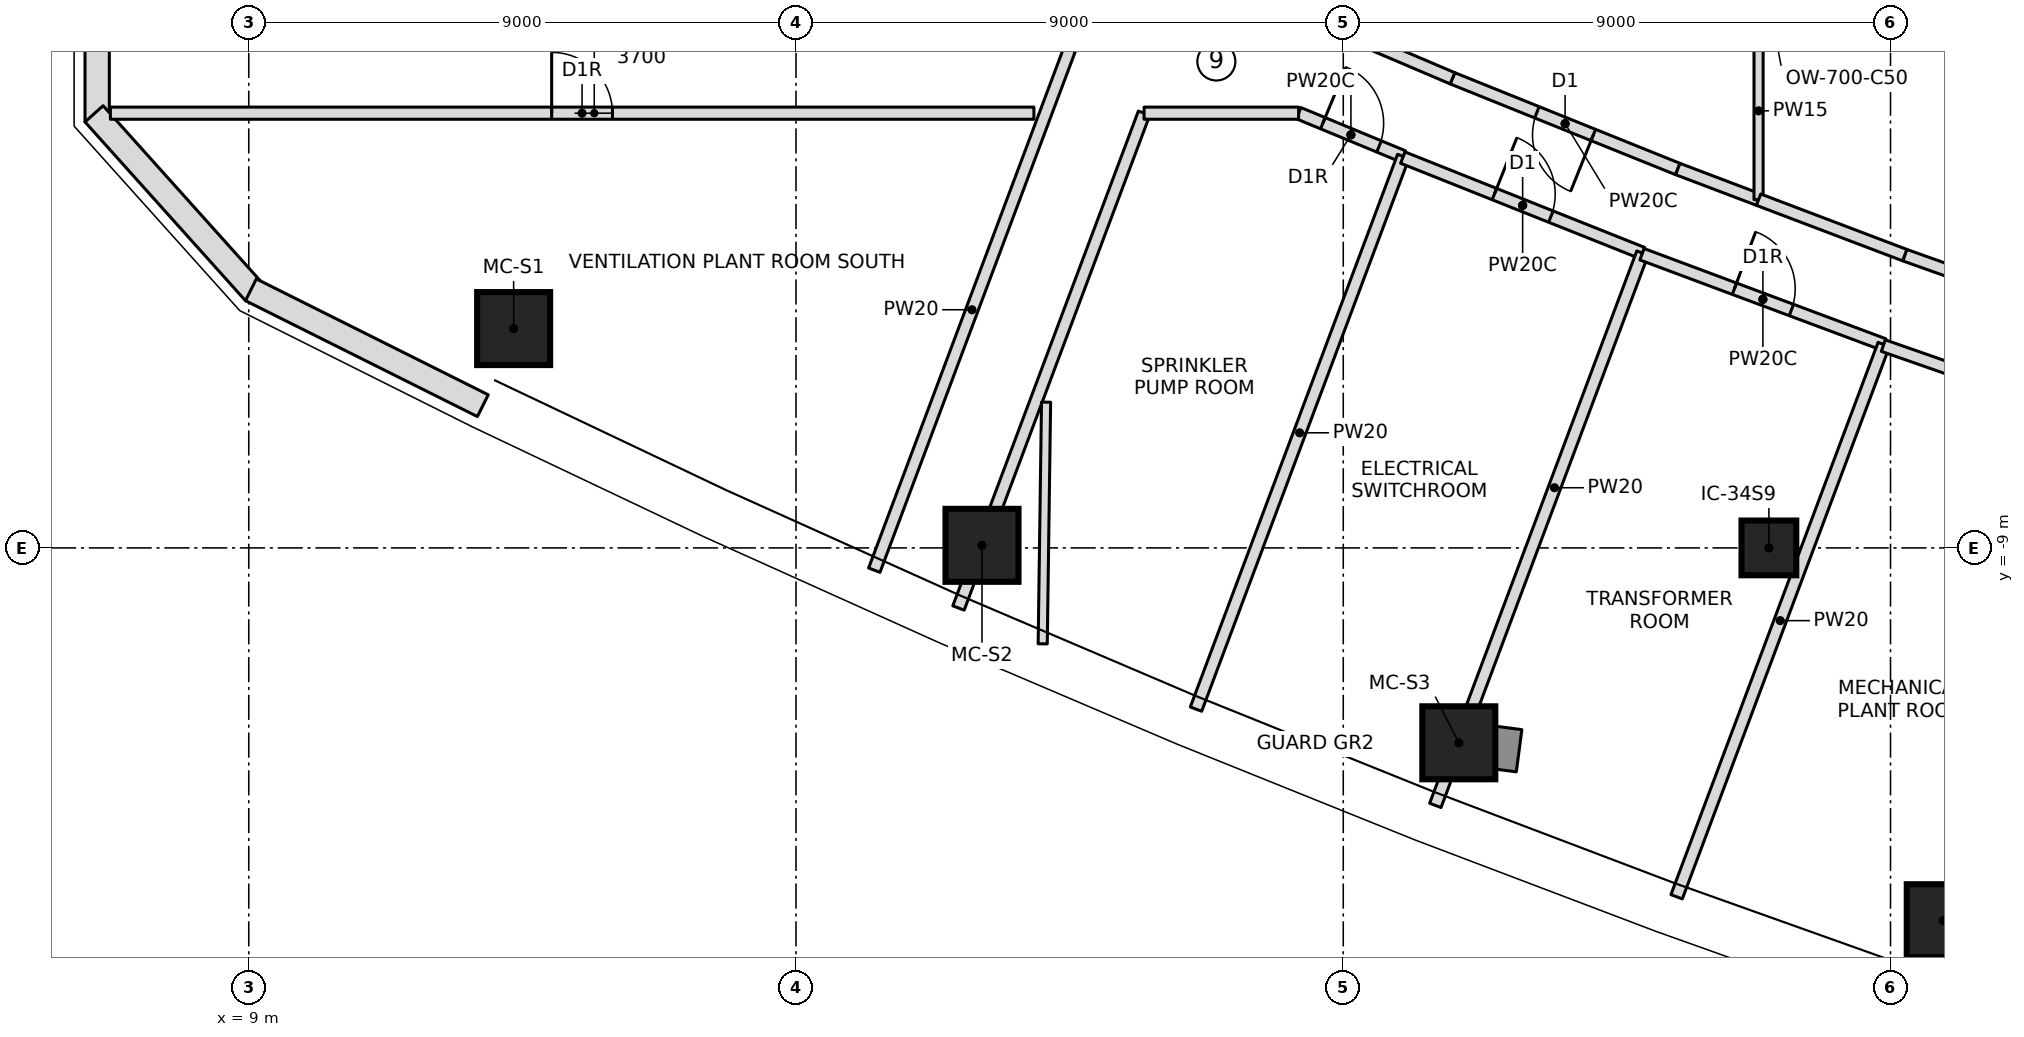
"""IFC4 building model, lengths in metres.
Left out: names, types, materials, properties, quantities, classifications, styles, units other than length and angle.
Written with IfcOpenShell. Run it as: python <this file> out.ifc"""

import sys

from ifc_helpers import new_model, si_unit, direction, frame, frame_2d, origin, origin_2d, place, context, subcontext, project, spatial, polyline, rectangle, outline, extrude, element, fill, save


model = new_model("IFC4")
c1 = context("Model", 3, precision=1e-05, world=origin(), true_north=direction((0.0, 1.0)))
c2 = subcontext(c1, "Body", "Model", "MODEL_VIEW")
j1 = project(units=[si_unit("LENGTHUNIT", "METRE"), si_unit("PLANEANGLEUNIT", "RADIAN")], contexts=[c1])
p1 = place(None, origin())
s1 = spatial("IfcSite", under=j1, at=p1, CompositionType="ELEMENT")
p2 = place(p1, origin())
s2 = spatial("IfcBuilding", under=s1, at=p2, CompositionType="ELEMENT")
p3 = place(p2, frame((0.0, 0.0, 256.3)))
s3 = spatial("IfcBuildingStorey", under=s2, at=p3, CompositionType="ELEMENT", Elevation=256.3)
for number, where, z_axis, x_axis in (
    (1, (13.356, -5.393, 0.0), (0.0, 0.0, 1.0), (1.0, 0.0, 0.0)),
    (2, (21.059, -8.958, 0.0), (0.0, 0.0, 1.0), (1.0, 0.0, 0.0)),
    (3, (28.9, -12.205, 0.0), (0.0, 0.0, 1.0), (1.0, 0.0, 0.0)),
    (4, (36.867, -15.132, 0.0), (0.0, 0.0, 1.0), (1.0, 0.0, 0.0)),
):
    element("IfcColumn", number, at=place(p3, frame(where, z_axis=z_axis, x_axis=x_axis)), inside=s3, PredefinedType="COLUMN", context=c2, shape_type="SweptSolid", body=[
        extrude(rectangle(XDim=1.2, YDim=1.2, at=origin_2d()), origin(), (0.0, 0.0, 1.0), 5.2),
    ])
p4 = place(p3, frame((34.0, -9.0, 0.0), z_axis=(0.0, 0.0, 1.0), x_axis=(1.0, 0.0, 0.0)))
e5 = element("IfcColumn", 5, at=p4, inside=s3, PredefinedType="COLUMN", context=c2, shape_type="SweptSolid", body=[
    extrude(rectangle(XDim=0.9, YDim=0.9, at=origin_2d()), origin(), (0.0, 0.0, 1.0), 7.0),
])
p5 = place(p3, frame((29.892, -12.336, 0.0), z_axis=(0.0, 0.0, 1.0), x_axis=(-0.991401867066, 0.130852351822, 0.0)))
e6 = element("IfcWall", 6, at=p5, inside=s3, PredefinedType="SHEAR", context=c2, shape_type="SweptSolid", body=[
    extrude(rectangle(XDim=1.0, YDim=0.7, at=frame_2d((0.5, 0.0))), origin(), (0.0, 0.0, 1.0), 6.7),
])
p6 = place(p3, frame((6.507, 1.918, 0.0), z_axis=(0.0, 0.0, 1.0), x_axis=(0.0, -1.0, 0.0)))
e7 = element("IfcWall", 7, at=p6, inside=s3, PredefinedType="NOTDEFINED", context=c2, shape_type="SweptSolid", body=[
    extrude(outline(polyline([(-0.077, -0.2), (3.912, -0.2), (3.759, 0.2), (0.077, 0.2), (-0.077, -0.2)])), origin(), (0.0, 0.0, 1.0), 6.7),
])
p7 = place(p3, frame((6.507, -1.918, 0.0), z_axis=(0.0, 0.0, 1.0), x_axis=(0.668018215058, -0.744144921605, 0.0)))
e8 = element("IfcWall", 8, at=p7, inside=s3, PredefinedType="NOTDEFINED", context=c2, shape_type="SweptSolid", body=[
    extrude(outline(polyline([(-0.077, -0.2), (3.874, -0.2), (3.798, 0.2), (0.077, 0.2), (-0.077, -0.2)])), origin(), (0.0, 0.0, 1.0), 6.7),
])
p8 = place(p3, frame((9.069, -4.772, 0.0), z_axis=(0.0, 0.0, 1.0), x_axis=(0.894554263274, -0.446959360634, 0.0)))
e9 = element("IfcWall", 9, at=p8, inside=s3, PredefinedType="NOTDEFINED", context=c2, shape_type="SweptSolid", body=[
    extrude(outline(polyline([(-0.038, -0.2), (4.226, -0.2), (4.226, 0.2), (0.038, 0.2), (-0.038, -0.2)])), origin(), (0.0, 0.0, 1.0), 6.7),
])
p9 = place(p3, frame((6.725, -1.85, 0.0), z_axis=(0.0, 0.0, 1.0), x_axis=(1.0, 0.0, 0.0)))
e10 = element("IfcWall", 10, at=p9, inside=s3, PredefinedType="PARTITIONING", context=c2, shape_type="SweptSolid", body=[
    extrude(rectangle(XDim=15.188, YDim=0.2, at=frame_2d((7.594, 0.0))), origin(), (0.0, 0.0, 1.0), 6.7),
])
p10 = place(p9, frame((7.257, 0.0, 0.0)))
e11 = element("IfcOpeningElement", 11, at=p10, cuts=e10, PredefinedType="OPENING", context=c2, shape_type="SweptSolid", body=[
    extrude(rectangle(XDim=1.0, YDim=2.1, at=frame_2d((0.5, 1.05))), frame((0.0, 0.11, 0.0), z_axis=(0.0, -1.0, 0.0), x_axis=(1.0, 0.0, 0.0)), (0.0, 0.0, 1.0), 0.22),
])
p11 = place(p3, frame((19.288, -9.366, 0.0), z_axis=(0.0, 0.0, 1.0), x_axis=(0.351132214998, 0.936325887494, 0.0)))
e12 = element("IfcWall", 12, at=p11, inside=s3, PredefinedType="PARTITIONING", context=c2, shape_type="SweptSolid", body=[
    extrude(rectangle(XDim=9.149, YDim=0.2, at=frame_2d((4.574, 0.0))), origin(), (0.0, 0.0, 1.0), 6.7),
])
p12 = place(p3, frame((20.672, -9.988, 0.0), z_axis=(0.0, 0.0, 1.0), x_axis=(0.351141911069, 0.936322251306, 0.0)))
e13 = element("IfcWall", 13, at=p12, inside=s3, PredefinedType="PARTITIONING", context=c2, shape_type="SweptSolid", body=[
    extrude(rectangle(XDim=8.692, YDim=0.2, at=frame_2d((4.346, 0.0))), origin(), (0.0, 0.0, 1.0), 6.7),
])
p13 = place(p3, frame((26.266, -1.85, 0.0), z_axis=(0.0, 0.0, 1.0), x_axis=(0.924055156704, -0.382259162569, 0.0)))
e14 = element("IfcWall", 14, at=p13, inside=s3, PredefinedType="PARTITIONING", context=c2, shape_type="SweptSolid", body=[
    extrude(rectangle(XDim=1.862, YDim=0.2, at=frame_2d((0.931, 0.0))), origin(), (0.0, 0.0, 1.0), 6.7),
])
p14 = place(p13, frame((0.431, 0.0, 0.0)))
e15 = element("IfcOpeningElement", 15, at=p14, cuts=e14, PredefinedType="OPENING", context=c2, shape_type="SweptSolid", body=[
    extrude(rectangle(XDim=1.0, YDim=2.1, at=frame_2d((0.5, 1.05))), frame((0.0, 0.11, 0.0), z_axis=(0.0, -1.0, 0.0), x_axis=(1.0, 0.0, 0.0)), (0.0, 0.0, 1.0), 0.22),
])
p15 = place(p3, frame((24.578, -11.652, 0.0), z_axis=(0.0, 0.0, 1.0), x_axis=(0.351153757858, 0.936317808408, 0.0)))
e16 = element("IfcWall", 16, at=p15, inside=s3, PredefinedType="PARTITIONING", context=c2, shape_type="SweptSolid", body=[
    extrude(rectangle(XDim=9.708, YDim=0.2, at=frame_2d((4.854, 0.0))), origin(), (0.0, 0.0, 1.0), 6.7),
])
p16 = place(p3, frame((27.98, -2.581, 0.0), z_axis=(0.0, 0.0, 1.0), x_axis=(0.928920552813, -0.370279092795, 0.0)))
e17 = element("IfcWall", 17, at=p16, inside=s3, PredefinedType="PARTITIONING", context=c2, shape_type="SweptSolid", body=[
    extrude(rectangle(XDim=4.242, YDim=0.2, at=frame_2d((2.121, 0.0))), origin(), (0.0, 0.0, 1.0), 6.7),
])
p17 = place(p16, frame((1.621, 0.0, 0.0)))
e18 = element("IfcOpeningElement", 18, at=p17, cuts=e17, PredefinedType="OPENING", context=c2, shape_type="SweptSolid", body=[
    extrude(rectangle(XDim=1.0, YDim=2.1, at=frame_2d((0.5, 1.05))), frame((0.0, 0.11, 0.0), z_axis=(0.0, -1.0, 0.0), x_axis=(1.0, 0.0, 0.0)), (0.0, 0.0, 1.0), 0.22),
])
p18 = place(p3, frame((28.514, -13.235, 0.0), z_axis=(0.0, 0.0, 1.0), x_axis=(0.351196471421, 0.936301788133, 0.0)))
e19 = element("IfcWall", 19, at=p18, inside=s3, PredefinedType="PARTITIONING", context=c2, shape_type="SweptSolid", body=[
    extrude(rectangle(XDim=1.099, YDim=0.2, at=frame_2d((0.55, 0.0))), origin(), (0.0, 0.0, 1.0), 6.7),
])
p19 = place(p3, frame((29.026, -11.869, 0.0), z_axis=(0.0, 0.0, 1.0), x_axis=(0.351120195515, 0.93633039484, 0.0)))
e20 = element("IfcWall", 20, at=p19, inside=s3, PredefinedType="PARTITIONING", context=c2, shape_type="SweptSolid", body=[
    extrude(rectangle(XDim=8.242, YDim=0.2, at=frame_2d((4.121, 0.0))), origin(), (0.0, 0.0, 1.0), 6.7),
])
p20 = place(p3, frame((31.913, -4.17, 0.0), z_axis=(0.0, 0.0, 1.0), x_axis=(0.936848300955, -0.349735987565, 0.0)))
e21 = element("IfcWall", 21, at=p20, inside=s3, PredefinedType="PARTITIONING", context=c2, shape_type="SweptSolid", body=[
    extrude(rectangle(XDim=4.244, YDim=0.2, at=frame_2d((2.122, 0.0))), origin(), (0.0, 0.0, 1.0), 6.7),
])
p21 = place(p20, frame((1.622, 0.0, 0.0)))
e22 = element("IfcOpeningElement", 22, at=p21, cuts=e21, PredefinedType="OPENING", context=c2, shape_type="SweptSolid", body=[
    extrude(rectangle(XDim=1.0, YDim=2.1, at=frame_2d((0.5, 1.05))), frame((0.0, 0.11, 0.0), z_axis=(0.0, -1.0, 0.0), x_axis=(1.0, 0.0, 0.0)), (0.0, 0.0, 1.0), 0.22),
])
p22 = place(p3, frame((32.483, -14.738, 0.0), z_axis=(0.0, 0.0, 1.0), x_axis=(0.351117925717, 0.936331246002, 0.0)))
e23 = element("IfcWall", 23, at=p22, inside=s3, PredefinedType="PARTITIONING", context=c2, shape_type="SweptSolid", body=[
    extrude(rectangle(XDim=9.701, YDim=0.2, at=frame_2d((4.851, 0.0))), origin(), (0.0, 0.0, 1.0), 6.7),
])
p23 = place(p3, frame((35.882, -5.673, 0.0), z_axis=(0.0, 0.0, 1.0), x_axis=(0.944107376821, -0.329638075823, 0.0)))
e24 = element("IfcWall", 24, at=p23, inside=s3, PredefinedType="PARTITIONING", context=c2, shape_type="SweptSolid", body=[
    extrude(rectangle(XDim=4.245, YDim=0.2, at=frame_2d((2.122, 0.0))), origin(), (0.0, 0.0, 1.0), 6.7),
])
p24 = place(p23, frame((1.622, 0.0, 0.0)))
e25 = element("IfcOpeningElement", 25, at=p24, cuts=e24, PredefinedType="OPENING", context=c2, shape_type="SweptSolid", body=[
    extrude(rectangle(XDim=1.0, YDim=2.1, at=frame_2d((0.5, 1.05))), frame((0.0, 0.11, 0.0), z_axis=(0.0, -1.0, 0.0), x_axis=(1.0, 0.0, 0.0)), (0.0, 0.0, 1.0), 0.22),
])
p25 = place(p3, frame((36.481, -16.161, 0.0), z_axis=(0.0, 0.0, 1.0), x_axis=(0.35112895446, 0.936327110224, 0.0)))
e26 = element("IfcWall", 26, at=p25, inside=s3, PredefinedType="PARTITIONING", context=c2, shape_type="SweptSolid", body=[
    extrude(rectangle(XDim=9.706, YDim=0.2, at=frame_2d((4.853, 0.0))), origin(), (0.0, 0.0, 1.0), 6.7),
])
p26 = place(p3, frame((32.501, -2.768, 0.0), z_axis=(0.0, 0.0, 1.0), x_axis=(-0.927622894464, 0.373518092823, 0.0)))
e27 = element("IfcWall", 27, at=p26, inside=s3, PredefinedType="PARTITIONING", context=c2, shape_type="SweptSolid", body=[
    extrude(rectangle(XDim=3.995, YDim=0.2, at=frame_2d((1.998, 0.0))), origin(), (0.0, 0.0, 1.0), 6.7),
])
p27 = place(p26, frame((1.498, 0.0, 0.0)))
e28 = element("IfcOpeningElement", 28, at=p27, cuts=e27, PredefinedType="OPENING", context=c2, shape_type="SweptSolid", body=[
    extrude(rectangle(XDim=1.0, YDim=2.1, at=frame_2d((0.5, 1.05))), frame((0.0, 0.11, 0.0), z_axis=(0.0, -1.0, 0.0), x_axis=(1.0, 0.0, 0.0)), (0.0, 0.0, 1.0), 0.22),
])
p28 = place(p3, frame((28.796, -1.276, 0.0), z_axis=(0.0, 0.0, 1.0), x_axis=(-0.919923264641, 0.392098440666, 0.0)))
e29 = element("IfcWall", 29, at=p28, inside=s3, PredefinedType="PARTITIONING", context=c2, shape_type="SweptSolid", body=[
    extrude(rectangle(XDim=1.408, YDim=0.2, at=frame_2d((0.704, 0.0))), origin(), (0.0, 0.0, 1.0), 6.7),
])
p29 = place(p3, frame((33.83, -3.272, 0.0), z_axis=(0.0, 0.0, 1.0), x_axis=(-0.934952335593, 0.354773350422, 0.0)))
e30 = element("IfcWall", 30, at=p29, inside=s3, PredefinedType="PARTITIONING", context=c2, shape_type="SweptSolid", body=[
    extrude(rectangle(XDim=1.421, YDim=0.2, at=frame_2d((0.71, 0.0))), origin(), (0.0, 0.0, 1.0), 6.7),
])
p30 = place(p3, frame((33.83, -3.272, 0.0), z_axis=(0.0, 0.0, 1.0), x_axis=(0.0, 1.0, 0.0)))
e31 = element("IfcWall", 31, at=p30, inside=s3, PredefinedType="PARTITIONING", context=c2, shape_type="SweptSolid", body=[
    extrude(rectangle(XDim=2.922, YDim=0.15, at=frame_2d((1.461, 0.0))), origin(), (0.0, 0.0, 1.0), 6.7),
])
p31 = place(p3, frame((36.236, -4.186, 0.0), z_axis=(0.0, 0.0, 1.0), x_axis=(-0.934949791539, 0.354780054825, 0.0)))
e32 = element("IfcWall", 32, at=p31, inside=s3, PredefinedType="PARTITIONING", context=c2, shape_type="SweptSolid", body=[
    extrude(rectangle(XDim=2.574, YDim=0.2, at=frame_2d((1.287, 0.0))), origin(), (0.0, 0.0, 1.0), 6.7),
])
p32 = place(p3, frame((39.105, -5.208, 0.0), z_axis=(0.0, 0.0, 1.0), x_axis=(-0.941905026751, 0.335879324433, 0.0)))
e33 = element("IfcWall", 33, at=p32, inside=s3, PredefinedType="PARTITIONING", context=c2, shape_type="SweptSolid", body=[
    extrude(rectangle(XDim=3.046, YDim=0.2, at=frame_2d((1.523, 0.0))), origin(), (0.0, 0.0, 1.0), 6.7),
])
p33 = place(p3, frame((22.112, -6.603, 0.0), z_axis=(0.0, 0.0, 1.0), x_axis=(-0.013880726457, -0.999903658076, 0.0)))
e34 = element("IfcWall", 34, at=p33, inside=s3, PredefinedType="PARTITIONING", context=c2, shape_type="SweptSolid", body=[
    extrude(rectangle(XDim=3.975, YDim=0.15, at=frame_2d((1.988, 0.0))), origin(), (0.0, 0.0, 1.0), 6.7),
])
p34 = place(p3, frame((23.724, -1.85, 0.0), z_axis=(0.0, 0.0, 1.0), x_axis=(1.0, 0.0, 0.0)))
e35 = element("IfcWall", 35, at=p34, inside=s3, PredefinedType="PARTITIONING", context=c2, shape_type="SweptSolid", body=[
    extrude(rectangle(XDim=2.542, YDim=0.2, at=frame_2d((1.271, 0.0))), origin(), (0.0, 0.0, 1.0), 6.7),
])
p35 = place(p10, origin())
e36 = element("IfcDoor", 36, at=p35, inside=s3, OperationType="SINGLE_SWING_RIGHT", PredefinedType="DOOR", context=c2, shape_type="SweptSolid", body=[
    extrude(rectangle(XDim=1.0, YDim=2.1, at=frame_2d((0.5, 1.05))), frame((0.0, 0.025, 0.0), z_axis=(0.0, -1.0, 0.0), x_axis=(1.0, 0.0, 0.0)), (0.0, 0.0, 1.0), 0.05),
])
fill(e11, e36)
p36 = place(p14, origin())
e37 = element("IfcDoor", 37, at=p36, inside=s3, OperationType="SINGLE_SWING_RIGHT", PredefinedType="DOOR", context=c2, shape_type="SweptSolid", body=[
    extrude(rectangle(XDim=1.0, YDim=2.1, at=frame_2d((0.5, 1.05))), frame((0.0, 0.025, 0.0), z_axis=(0.0, -1.0, 0.0), x_axis=(1.0, 0.0, 0.0)), (0.0, 0.0, 1.0), 0.05),
])
fill(e15, e37)
p37 = place(p17, origin())
e38 = element("IfcDoor", 38, at=p37, inside=s3, OperationType="SINGLE_SWING_LEFT", PredefinedType="DOOR", context=c2, shape_type="SweptSolid", body=[
    extrude(rectangle(XDim=1.0, YDim=2.1, at=frame_2d((0.5, 1.05))), frame((0.0, 0.025, 0.0), z_axis=(0.0, -1.0, 0.0), x_axis=(1.0, 0.0, 0.0)), (0.0, 0.0, 1.0), 0.05),
])
fill(e18, e38)
p38 = place(p21, origin())
e39 = element("IfcDoor", 39, at=p38, inside=s3, OperationType="SINGLE_SWING_RIGHT", PredefinedType="DOOR", context=c2, shape_type="SweptSolid", body=[
    extrude(rectangle(XDim=1.0, YDim=2.1, at=frame_2d((0.5, 1.05))), frame((0.0, 0.025, 0.0), z_axis=(0.0, -1.0, 0.0), x_axis=(1.0, 0.0, 0.0)), (0.0, 0.0, 1.0), 0.05),
])
fill(e22, e39)
p39 = place(p27, origin())
e40 = element("IfcDoor", 40, at=p39, inside=s3, OperationType="SINGLE_SWING_LEFT", PredefinedType="DOOR", context=c2, shape_type="SweptSolid", body=[
    extrude(rectangle(XDim=1.0, YDim=2.1, at=frame_2d((0.5, 1.05))), frame((0.0, 0.025, 0.0), z_axis=(0.0, -1.0, 0.0), x_axis=(1.0, 0.0, 0.0)), (0.0, 0.0, 1.0), 0.05),
])
fill(e28, e40)
save(model, sys.argv[1])
